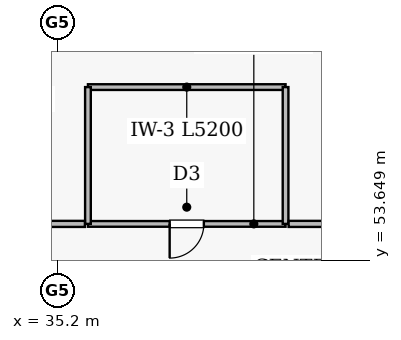
"""IFC4 building model, lengths in metres.
Left out: names, types, materials, properties, quantities, classifications, styles, units other than length and angle.
Written with IfcOpenShell. Run it as: python <this file> out.ifc"""

import sys

from ifc_helpers import new_model, si_unit, direction, frame, frame_2d, origin, place, context, subcontext, project, spatial, rectangle, extrude, element, fill, save


model = new_model("IFC4")
c1 = context("Model", 3, precision=1e-05, world=origin(), true_north=direction((0.0, 1.0)))
c2 = subcontext(c1, "Body", "Model", "MODEL_VIEW")
j1 = project(units=[si_unit("LENGTHUNIT", "METRE"), si_unit("PLANEANGLEUNIT", "RADIAN")], contexts=[c1])
p1 = place(None, origin())
s1 = spatial("IfcSite", under=j1, at=p1, CompositionType="ELEMENT")
p2 = place(p1, origin())
s2 = spatial("IfcBuilding", under=s1, at=p2, CompositionType="ELEMENT")
p3 = place(p2, frame((0.0, 0.0, 95.8)))
s3 = spatial("IfcBuildingStorey", under=s2, at=p3, CompositionType="ELEMENT", Elevation=95.8)
p4 = place(p3, frame((41.2, 54.6, 0.0), z_axis=(0.0, 0.0, 1.0), x_axis=(-1.0, 0.0, 0.0)))
e1 = element("IfcWall", 1, at=p4, inside=s3, PredefinedType="PLUMBINGWALL", context=c2, shape_type="SweptSolid", body=[
    extrude(rectangle(XDim=5.2, YDim=0.15, at=frame_2d((2.6, 0.0))), origin(), (0.0, 0.0, 1.0), 3.835),
])
p5 = place(p4, frame((2.15, 0.0, 0.0)))
e2 = element("IfcOpeningElement", 2, at=p5, cuts=e1, PredefinedType="OPENING", context=c2, shape_type="SweptSolid", body=[
    extrude(rectangle(XDim=0.9, YDim=2.1, at=frame_2d((0.45, 1.05))), frame((0.0, 0.085, 0.0), z_axis=(0.0, -1.0, 0.0), x_axis=(1.0, 0.0, 0.0)), (0.0, 0.0, 1.0), 0.17),
])
p6 = place(p3, frame((41.2, 58.2, 0.0), z_axis=(0.0, 0.0, 1.0), x_axis=(-1.0, 0.0, 0.0)))
e3 = element("IfcWall", 3, at=p6, inside=s3, PredefinedType="PLUMBINGWALL", context=c2, shape_type="SweptSolid", body=[
    extrude(rectangle(XDim=5.2, YDim=0.15, at=frame_2d((2.6, 0.0))), origin(), (0.0, 0.0, 1.0), 3.823),
])
p7 = place(p3, frame((41.2, 54.6, 0.0), z_axis=(0.0, 0.0, 1.0), x_axis=(0.0, 1.0, 0.0)))
e4 = element("IfcWall", 4, at=p7, inside=s3, PredefinedType="PLUMBINGWALL", context=c2, shape_type="SweptSolid", body=[
    extrude(rectangle(XDim=3.6, YDim=0.15, at=frame_2d((1.8, 0.0))), origin(), (0.0, 0.0, 1.0), 3.835),
])
p8 = place(p3, frame((36.0, 58.2, 0.0), z_axis=(0.0, 0.0, 1.0), x_axis=(0.0, -1.0, 0.0)))
e5 = element("IfcWall", 5, at=p8, inside=s3, PredefinedType="PLUMBINGWALL", context=c2, shape_type="SweptSolid", body=[
    extrude(rectangle(XDim=3.6, YDim=0.15, at=frame_2d((1.8, 0.0))), origin(), (0.0, 0.0, 1.0), 3.823),
])
p9 = place(p3, frame((43.92, 54.6, 0.0), z_axis=(0.0, 0.0, 1.0), x_axis=(-1.0, 0.0, 0.0)))
e6 = element("IfcWall", 6, at=p9, inside=s3, PredefinedType="SOLIDWALL", context=c2, shape_type="SweptSolid", body=[
    extrude(rectangle(XDim=2.64, YDim=0.16, at=frame_2d((1.32, 0.0))), origin(), (0.0, 0.0, 1.0), 3.835),
])
p10 = place(p3, frame((35.92, 54.6, 0.0), z_axis=(0.0, 0.0, 1.0), x_axis=(-1.0, 0.0, 0.0)))
e7 = element("IfcWall", 7, at=p10, inside=s3, PredefinedType="SOLIDWALL", context=c2, shape_type="SweptSolid", body=[
    extrude(rectangle(XDim=2.44, YDim=0.16, at=frame_2d((1.22, 0.0))), origin(), (0.0, 0.0, 1.0), 3.823),
])
p11 = place(p5, origin())
e8 = element("IfcDoor", 8, at=p11, inside=s3, OperationType="SINGLE_SWING_RIGHT", PredefinedType="DOOR", context=c2, shape_type="SweptSolid", body=[
    extrude(rectangle(XDim=0.9, YDim=2.1, at=frame_2d((0.45, 1.05))), frame((0.0, 0.025, 0.0), z_axis=(0.0, -1.0, 0.0), x_axis=(1.0, 0.0, 0.0)), (0.0, 0.0, 1.0), 0.05),
])
fill(e2, e8)
save(model, sys.argv[1])
